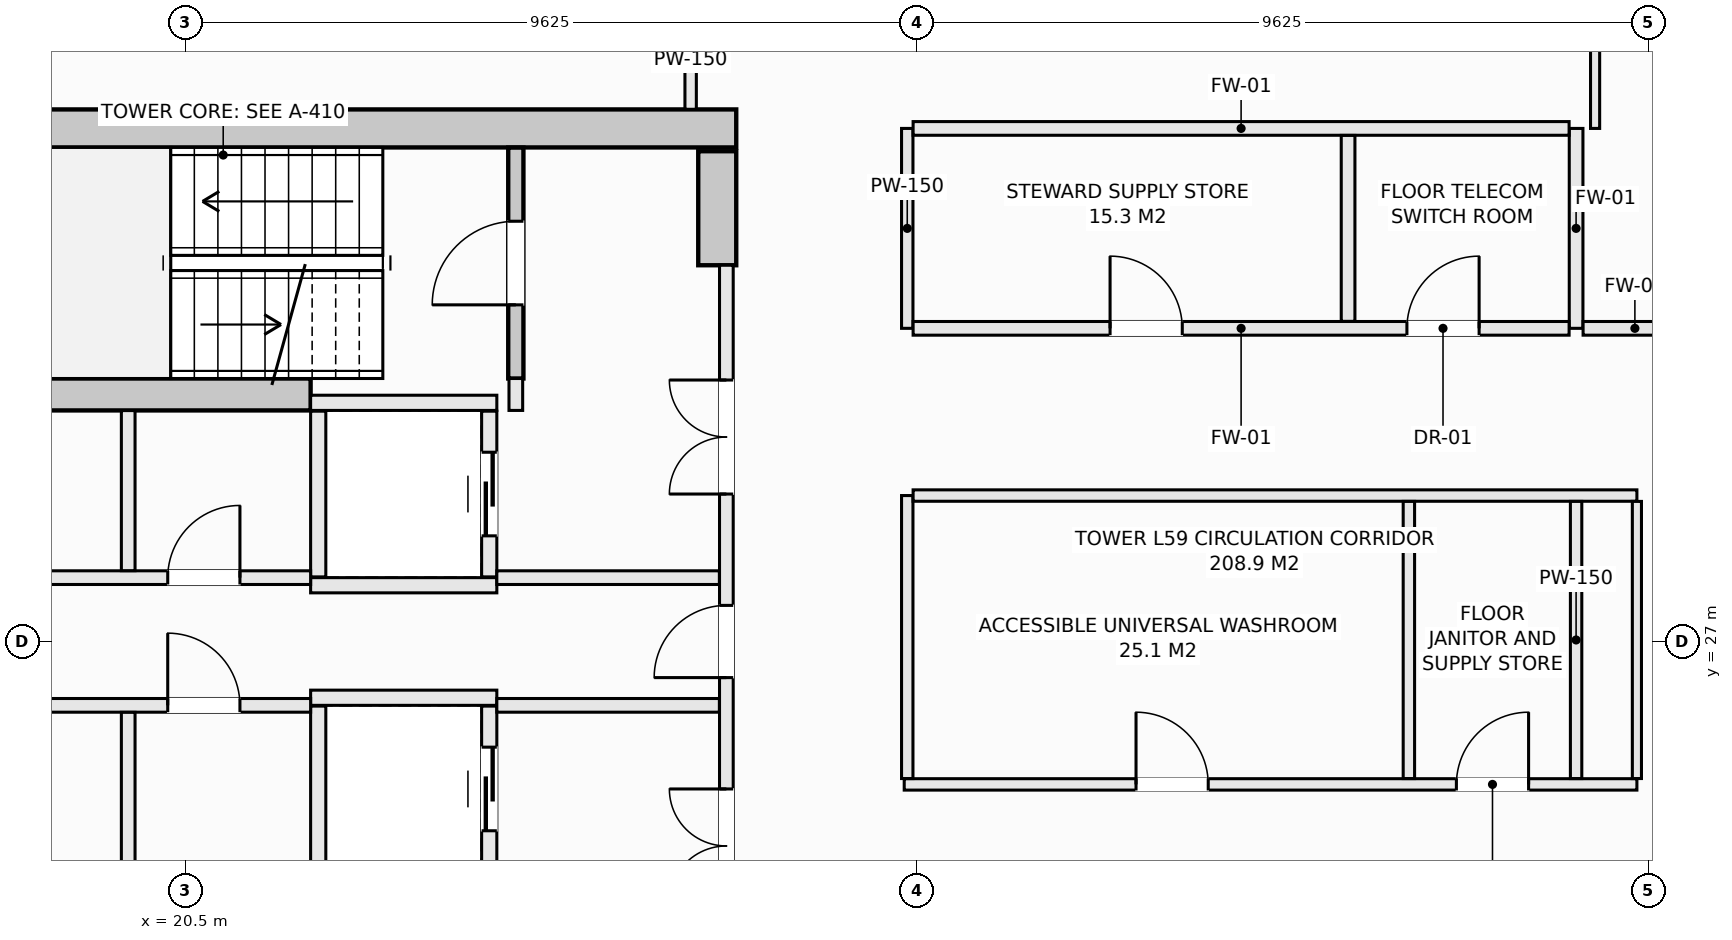
"""IFC4 building model, lengths in metres.
Left out: names, types, materials, properties, quantities, classifications, styles, units other than length and angle.
Written with IfcOpenShell. Run it as: python <this file> out.ifc"""

import sys

from ifc_helpers import new_model, si_unit, direction, frame, frame_2d, origin, place, context, subcontext, project, spatial, rectangle, extrude, element, fill, save


model = new_model("IFC4")
c1 = context("Model", 3, precision=1e-05, world=origin(), true_north=direction((0.0, 1.0)))
c2 = subcontext(c1, "Body", "Model", "MODEL_VIEW")
j1 = project(units=[si_unit("LENGTHUNIT", "METRE"), si_unit("PLANEANGLEUNIT", "RADIAN")], contexts=[c1])
p1 = place(None, origin())
s1 = spatial("IfcSite", under=j1, at=p1, CompositionType="ELEMENT")
p2 = place(p1, origin())
s2 = spatial("IfcBuilding", under=s1, at=p2, CompositionType="ELEMENT")
p3 = place(p2, frame((0.0, 0.0, 222.8)))
s3 = spatial("IfcBuildingStorey", under=s2, at=p3, CompositionType="ELEMENT", Elevation=222.8)
p4 = place(p3, frame((14.25, 33.75, -0.27), z_axis=(0.0, 0.0, 1.0), x_axis=(1.0, 0.0, 0.0)))
e1 = element("IfcWall", 1, at=p4, inside=s3, PredefinedType="SHEAR", context=c2, shape_type="SweptSolid", body=[
    extrude(rectangle(XDim=13.5, YDim=0.5, at=frame_2d((6.75, 0.0))), origin(), (0.0, 0.0, 1.0), 3.3),
])
p5 = place(p3, frame((27.5, 31.95, -0.27), z_axis=(0.0, 0.0, 1.0), x_axis=(0.0, 1.0, 0.0)))
e2 = element("IfcWall", 2, at=p5, inside=s3, PredefinedType="SHEAR", context=c2, shape_type="SweptSolid", body=[
    extrude(rectangle(XDim=1.5, YDim=0.5, at=frame_2d((0.75, 0.0))), origin(), (0.0, 0.0, 1.0), 3.3),
])
p6 = place(p3, frame((14.85, 30.25, -0.27), z_axis=(0.0, 0.0, 1.0), x_axis=(1.0, 0.0, 0.0)))
e3 = element("IfcWall", 3, at=p6, inside=s3, PredefinedType="SHEAR", context=c2, shape_type="SweptSolid", body=[
    extrude(rectangle(XDim=7.3, YDim=0.42, at=frame_2d((3.65, 0.0))), origin(), (0.0, 0.0, 1.0), 3.3),
])
p7 = place(p3, frame((24.85, 30.46, -0.27), z_axis=(0.0, 0.0, 1.0), x_axis=(0.0, 1.0, 0.0)))
e4 = element("IfcWall", 4, at=p7, inside=s3, PredefinedType="SHEAR", context=c2, shape_type="SweptSolid", body=[
    extrude(rectangle(XDim=3.038, YDim=0.2, at=frame_2d((1.519, 0.0))), origin(), (0.0, 0.0, 1.0), 3.3),
])
p8 = place(p7, frame((0.969, 0.0, 0.27)))
e5 = element("IfcOpeningElement", 5, at=p8, cuts=e4, PredefinedType="OPENING", context=c2, shape_type="SweptSolid", body=[
    extrude(rectangle(XDim=1.1, YDim=2.15, at=frame_2d((0.55, 1.075))), frame((0.0, 0.11, 0.0), z_axis=(0.0, -1.0, 0.0), x_axis=(1.0, 0.0, 0.0)), (0.0, 0.0, 1.0), 0.22),
])
for number, where, z_axis, x_axis in (
    (6, (22.15, 30.14, 0.0), (0.0, 0.0, 1.0), (1.0, 0.0, 0.0)),
    (7, (22.15, 27.74, 0.0), (0.0, 0.0, 1.0), (1.0, 0.0, 0.0)),
):
    element("IfcWall", number, at=place(p3, frame(where, z_axis=z_axis, x_axis=x_axis)), inside=s3, PredefinedType="SOLIDWALL", context=c2, shape_type="SweptSolid", body=[
        extrude(rectangle(XDim=2.45, YDim=0.2, at=frame_2d((1.225, 0.0))), origin(), (0.0, 0.0, 1.0), 3.03),
    ])
p9 = place(p3, frame((22.25, 27.85, 0.0), z_axis=(0.0, 0.0, 1.0), x_axis=(0.0, 1.0, 0.0)))
e8 = element("IfcWall", 8, at=p9, inside=s3, PredefinedType="SOLIDWALL", context=c2, shape_type="SweptSolid", body=[
    extrude(rectangle(XDim=2.18, YDim=0.2, at=frame_2d((1.09, 0.0))), origin(), (0.0, 0.0, 1.0), 3.03),
])
p10 = place(p3, frame((24.5, 27.85, 0.0), z_axis=(0.0, 0.0, 1.0), x_axis=(0.0, 1.0, 0.0)))
e9 = element("IfcWall", 9, at=p10, inside=s3, PredefinedType="SOLIDWALL", context=c2, shape_type="SweptSolid", body=[
    extrude(rectangle(XDim=2.18, YDim=0.2, at=frame_2d((1.09, 0.0))), origin(), (0.0, 0.0, 1.0), 3.03),
])
p11 = place(p10, frame((0.54, 0.0, 0.0)))
e10 = element("IfcOpeningElement", 10, at=p11, cuts=e9, PredefinedType="OPENING", context=c2, shape_type="SweptSolid", body=[
    extrude(rectangle(XDim=1.1, YDim=2.2, at=frame_2d((0.55, 1.1))), frame((0.0, 0.11, 0.0), z_axis=(0.0, -1.0, 0.0), x_axis=(1.0, 0.0, 0.0)), (0.0, 0.0, 1.0), 0.22),
])
p12 = place(p3, frame((22.15, 26.26, 0.0), z_axis=(0.0, 0.0, 1.0), x_axis=(1.0, 0.0, 0.0)))
e11 = element("IfcWall", 11, at=p12, inside=s3, PredefinedType="SOLIDWALL", context=c2, shape_type="SweptSolid", body=[
    extrude(rectangle(XDim=2.45, YDim=0.2, at=frame_2d((1.225, 0.0))), origin(), (0.0, 0.0, 1.0), 3.03),
])
p13 = place(p3, frame((22.25, 23.97, 0.0), z_axis=(0.0, 0.0, 1.0), x_axis=(0.0, 1.0, 0.0)))
e12 = element("IfcWall", 12, at=p13, inside=s3, PredefinedType="SOLIDWALL", context=c2, shape_type="SweptSolid", body=[
    extrude(rectangle(XDim=2.18, YDim=0.2, at=frame_2d((1.09, 0.0))), origin(), (0.0, 0.0, 1.0), 3.03),
])
p14 = place(p3, frame((24.5, 23.97, 0.0), z_axis=(0.0, 0.0, 1.0), x_axis=(0.0, 1.0, 0.0)))
e13 = element("IfcWall", 13, at=p14, inside=s3, PredefinedType="SOLIDWALL", context=c2, shape_type="SweptSolid", body=[
    extrude(rectangle(XDim=2.18, YDim=0.2, at=frame_2d((1.09, 0.0))), origin(), (0.0, 0.0, 1.0), 3.03),
])
p15 = place(p14, frame((0.54, 0.0, 0.0)))
e14 = element("IfcOpeningElement", 14, at=p15, cuts=e13, PredefinedType="OPENING", context=c2, shape_type="SweptSolid", body=[
    extrude(rectangle(XDim=1.1, YDim=2.2, at=frame_2d((0.55, 1.1))), frame((0.0, 0.11, 0.0), z_axis=(0.0, -1.0, 0.0), x_axis=(1.0, 0.0, 0.0)), (0.0, 0.0, 1.0), 0.22),
])
p16 = place(p3, frame((24.85, 30.04, 0.0), z_axis=(0.0, 0.0, 1.0), x_axis=(0.0, 1.0, 0.0)))
e15 = element("IfcWall", 15, at=p16, inside=s3, PredefinedType="SOLIDWALL", context=c2, shape_type="SweptSolid", body=[
    extrude(rectangle(XDim=0.42, YDim=0.18, at=frame_2d((0.21, 0.0))), origin(), (0.0, 0.0, 1.0), 3.03),
])
p17 = place(p3, frame((27.62, 22.05, 0.0), z_axis=(0.0, 0.0, 1.0), x_axis=(0.0, 1.0, 0.0)))
e16 = element("IfcWall", 16, at=p17, inside=s3, PredefinedType="SOLIDWALL", context=c2, shape_type="SweptSolid", body=[
    extrude(rectangle(XDim=9.9, YDim=0.18, at=frame_2d((4.95, 0.0))), origin(), (0.0, 0.0, 1.0), 3.03),
])
p18 = place(p17, frame((4.475, 0.0, 0.0)))
e17 = element("IfcOpeningElement", 17, at=p18, cuts=e16, PredefinedType="OPENING", context=c2, shape_type="SweptSolid", body=[
    extrude(rectangle(XDim=0.95, YDim=2.1, at=frame_2d((0.475, 1.05))), frame((0.0, 0.1, 0.0), z_axis=(0.0, -1.0, 0.0), x_axis=(1.0, 0.0, 0.0)), (0.0, 0.0, 1.0), 0.2),
])
p19 = place(p17, frame((6.89, 0.0, 0.0)))
e18 = element("IfcOpeningElement", 18, at=p19, cuts=e16, PredefinedType="OPENING", context=c2, shape_type="SweptSolid", body=[
    extrude(rectangle(XDim=1.5, YDim=2.2, at=frame_2d((0.75, 1.1))), frame((0.0, 0.1, 0.0), z_axis=(0.0, -1.0, 0.0), x_axis=(1.0, 0.0, 0.0)), (0.0, 0.0, 1.0), 0.2),
])
p20 = place(p17, frame((1.51, 0.0, 0.0)))
e19 = element("IfcOpeningElement", 19, at=p20, cuts=e16, PredefinedType="OPENING", context=c2, shape_type="SweptSolid", body=[
    extrude(rectangle(XDim=1.5, YDim=2.2, at=frame_2d((0.75, 1.1))), frame((0.0, 0.1, 0.0), z_axis=(0.0, -1.0, 0.0), x_axis=(1.0, 0.0, 0.0)), (0.0, 0.0, 1.0), 0.2),
])
p21 = place(p3, frame((15.25, 27.84, 0.0), z_axis=(0.0, 0.0, 1.0), x_axis=(1.0, 0.0, 0.0)))
e20 = element("IfcWall", 20, at=p21, inside=s3, PredefinedType="SOLIDWALL", context=c2, shape_type="SweptSolid", body=[
    extrude(rectangle(XDim=6.9, YDim=0.18, at=frame_2d((3.45, 0.0))), origin(), (0.0, 0.0, 1.0), 3.03),
])
p22 = place(p21, frame((5.02, 0.0, 0.0)))
e21 = element("IfcOpeningElement", 21, at=p22, cuts=e20, PredefinedType="OPENING", context=c2, shape_type="SweptSolid", body=[
    extrude(rectangle(XDim=0.95, YDim=2.1, at=frame_2d((0.475, 1.05))), frame((0.0, 0.1, 0.0), z_axis=(0.0, -1.0, 0.0), x_axis=(1.0, 0.0, 0.0)), (0.0, 0.0, 1.0), 0.2),
])
p23 = place(p21, frame((1.98, 0.0, 0.0)))
e22 = element("IfcOpeningElement", 22, at=p23, cuts=e20, PredefinedType="OPENING", context=c2, shape_type="SweptSolid", body=[
    extrude(rectangle(XDim=0.95, YDim=2.1, at=frame_2d((0.475, 1.05))), frame((0.0, 0.1, 0.0), z_axis=(0.0, -1.0, 0.0), x_axis=(1.0, 0.0, 0.0)), (0.0, 0.0, 1.0), 0.2),
])
p24 = place(p3, frame((24.6, 27.84, 0.0), z_axis=(0.0, 0.0, 1.0), x_axis=(1.0, 0.0, 0.0)))
e23 = element("IfcWall", 23, at=p24, inside=s3, PredefinedType="SOLIDWALL", context=c2, shape_type="SweptSolid", body=[
    extrude(rectangle(XDim=2.928, YDim=0.18, at=frame_2d((1.464, 0.0))), origin(), (0.0, 0.0, 1.0), 3.03),
])
p25 = place(p3, frame((15.25, 26.16, 0.0), z_axis=(0.0, 0.0, 1.0), x_axis=(1.0, 0.0, 0.0)))
e24 = element("IfcWall", 24, at=p25, inside=s3, PredefinedType="SOLIDWALL", context=c2, shape_type="SweptSolid", body=[
    extrude(rectangle(XDim=6.9, YDim=0.18, at=frame_2d((3.45, 0.0))), origin(), (0.0, 0.0, 1.0), 3.03),
])
p26 = place(p25, frame((5.02, 0.0, 0.0)))
e25 = element("IfcOpeningElement", 25, at=p26, cuts=e24, PredefinedType="OPENING", context=c2, shape_type="SweptSolid", body=[
    extrude(rectangle(XDim=0.95, YDim=2.1, at=frame_2d((0.475, 1.05))), frame((0.0, 0.1, 0.0), z_axis=(0.0, -1.0, 0.0), x_axis=(1.0, 0.0, 0.0)), (0.0, 0.0, 1.0), 0.2),
])
p27 = place(p25, frame((1.98, 0.0, 0.0)))
e26 = element("IfcOpeningElement", 26, at=p27, cuts=e24, PredefinedType="OPENING", context=c2, shape_type="SweptSolid", body=[
    extrude(rectangle(XDim=0.95, YDim=2.1, at=frame_2d((0.475, 1.05))), frame((0.0, 0.1, 0.0), z_axis=(0.0, -1.0, 0.0), x_axis=(1.0, 0.0, 0.0)), (0.0, 0.0, 1.0), 0.2),
])
p28 = place(p3, frame((24.6, 26.16, 0.0), z_axis=(0.0, 0.0, 1.0), x_axis=(1.0, 0.0, 0.0)))
e27 = element("IfcWall", 27, at=p28, inside=s3, PredefinedType="SOLIDWALL", context=c2, shape_type="SweptSolid", body=[
    extrude(rectangle(XDim=2.928, YDim=0.18, at=frame_2d((1.464, 0.0))), origin(), (0.0, 0.0, 1.0), 3.03),
])
for number, where, z_axis, x_axis in (
    (28, (19.75, 23.962, 0.0), (0.0, 0.0, 1.0), (0.0, 1.0, 0.0)),
    (29, (19.75, 27.932, 0.0), (0.0, 0.0, 1.0), (0.0, 1.0, 0.0)),
):
    element("IfcWall", number, at=place(p3, frame(where, z_axis=z_axis, x_axis=x_axis)), inside=s3, PredefinedType="SOLIDWALL", context=c2, shape_type="SweptSolid", body=[
        extrude(rectangle(XDim=2.106, YDim=0.18, at=frame_2d((1.053, 0.0))), origin(), (0.0, 0.0, 1.0), 3.03),
    ])
p29 = place(p3, frame((27.15, 34.002, 0.0), z_axis=(0.0, 0.0, 1.0), x_axis=(0.0, 1.0, 0.0)))
e30 = element("IfcWall", 30, at=p29, inside=s3, PredefinedType="PARTITIONING", context=c2, shape_type="SweptSolid", body=[
    extrude(rectangle(XDim=4.198, YDim=0.15, at=frame_2d((2.099, 0.0))), origin(), (0.0, 0.0, 1.0), 3.03),
])
p30 = place(p29, frame((1.998, 0.0, 0.0)))
e31 = element("IfcOpeningElement", 31, at=p30, cuts=e30, PredefinedType="OPENING", context=c2, shape_type="SweptSolid", body=[
    extrude(rectangle(XDim=0.95, YDim=2.1, at=frame_2d((0.475, 1.05))), frame((0.0, 0.085, 0.0), z_axis=(0.0, -1.0, 0.0), x_axis=(1.0, 0.0, 0.0)), (0.0, 0.0, 1.0), 0.17),
])
p31 = place(p3, frame((29.96, 25.12, 0.0), z_axis=(0.0, 0.0, 1.0), x_axis=(1.0, 0.0, 0.0)))
e32 = element("IfcWall", 32, at=p31, inside=s3, PredefinedType="PARTITIONING", context=c2, shape_type="SweptSolid", body=[
    extrude(rectangle(XDim=9.64, YDim=0.15, at=frame_2d((4.82, 0.0))), origin(), (0.0, 0.0, 1.0), 3.03),
])
p32 = place(p31, frame((3.05, 0.0, 0.0)))
e33 = element("IfcOpeningElement", 33, at=p32, cuts=e32, PredefinedType="OPENING", context=c2, shape_type="SweptSolid", body=[
    extrude(rectangle(XDim=0.95, YDim=2.1, at=frame_2d((0.475, 1.05))), frame((0.0, 0.085, 0.0), z_axis=(0.0, -1.0, 0.0), x_axis=(1.0, 0.0, 0.0)), (0.0, 0.0, 1.0), 0.17),
])
p33 = place(p31, frame((7.265, 0.0, 0.0)))
e34 = element("IfcOpeningElement", 34, at=p33, cuts=e32, PredefinedType="OPENING", context=c2, shape_type="SweptSolid", body=[
    extrude(rectangle(XDim=0.95, YDim=2.1, at=frame_2d((0.475, 1.05))), frame((0.0, 0.085, 0.0), z_axis=(0.0, -1.0, 0.0), x_axis=(1.0, 0.0, 0.0)), (0.0, 0.0, 1.0), 0.17),
])
p34 = place(p3, frame((30.0, 25.197, 0.0), z_axis=(0.0, 0.0, 1.0), x_axis=(0.0, 1.0, 0.0)))
e35 = element("IfcWall", 35, at=p34, inside=s3, PredefinedType="PARTITIONING", context=c2, shape_type="SweptSolid", body=[
    extrude(rectangle(XDim=3.723, YDim=0.15, at=frame_2d((1.861, 0.0))), origin(), (0.0, 0.0, 1.0), 3.03),
])
p35 = place(p3, frame((30.0, 31.12, 0.0), z_axis=(0.0, 0.0, 1.0), x_axis=(0.0, 1.0, 0.0)))
e36 = element("IfcWall", 36, at=p35, inside=s3, PredefinedType="PARTITIONING", context=c2, shape_type="SweptSolid", body=[
    extrude(rectangle(XDim=2.63, YDim=0.15, at=frame_2d((1.315, 0.0))), origin(), (0.0, 0.0, 1.0), 3.03),
])
p36 = place(p3, frame((30.077, 28.92, 0.0), z_axis=(0.0, 0.0, 1.0), x_axis=(1.0, 0.0, 0.0)))
e37 = element("IfcWall", 37, at=p36, inside=s3, PredefinedType="PARTITIONING", context=c2, shape_type="SweptSolid", body=[
    extrude(rectangle(XDim=9.523, YDim=0.15, at=frame_2d((4.762, 0.0))), origin(), (0.0, 0.0, 1.0), 3.03),
])
for number, where, z_axis, x_axis in (
    (38, (36.6, 25.197, 0.0), (0.0, 0.0, 1.0), (0.0, 1.0, 0.0)),
    (39, (38.8, 25.197, 0.0), (0.0, 0.0, 1.0), (0.0, 1.0, 0.0)),
):
    element("IfcWall", number, at=place(p3, frame(where, z_axis=z_axis, x_axis=x_axis)), inside=s3, PredefinedType="PARTITIONING", context=c2, shape_type="SweptSolid", body=[
        extrude(rectangle(XDim=3.646, YDim=0.15, at=frame_2d((1.823, 0.0))), origin(), (0.0, 0.0, 1.0), 3.03),
    ])
p37 = place(p3, frame((38.8, 31.12, 0.0), z_axis=(0.0, 0.0, 1.0), x_axis=(0.0, 1.0, 0.0)))
e40 = element("IfcWall", 40, at=p37, inside=s3, PredefinedType="SOLIDWALL", context=c2, shape_type="SweptSolid", body=[
    extrude(rectangle(XDim=2.63, YDim=0.18, at=frame_2d((1.315, 0.0))), origin(), (0.0, 0.0, 1.0), 3.03),
])
p38 = place(p3, frame((30.077, 31.12, 0.0), z_axis=(0.0, 0.0, 1.0), x_axis=(1.0, 0.0, 0.0)))
e41 = element("IfcWall", 41, at=p38, inside=s3, PredefinedType="SOLIDWALL", context=c2, shape_type="SweptSolid", body=[
    extrude(rectangle(XDim=8.631, YDim=0.18, at=frame_2d((4.315, 0.0))), origin(), (0.0, 0.0, 1.0), 3.03),
])
p39 = place(p38, frame((2.592, 0.0, 0.0)))
e42 = element("IfcOpeningElement", 42, at=p39, cuts=e41, PredefinedType="OPENING", context=c2, shape_type="SweptSolid", body=[
    extrude(rectangle(XDim=0.95, YDim=2.1, at=frame_2d((0.475, 1.05))), frame((0.0, 0.1, 0.0), z_axis=(0.0, -1.0, 0.0), x_axis=(1.0, 0.0, 0.0)), (0.0, 0.0, 1.0), 0.2),
])
p40 = place(p38, frame((6.497, 0.0, 0.0)))
e43 = element("IfcOpeningElement", 43, at=p40, cuts=e41, PredefinedType="OPENING", context=c2, shape_type="SweptSolid", body=[
    extrude(rectangle(XDim=0.95, YDim=2.1, at=frame_2d((0.475, 1.05))), frame((0.0, 0.1, 0.0), z_axis=(0.0, -1.0, 0.0), x_axis=(1.0, 0.0, 0.0)), (0.0, 0.0, 1.0), 0.2),
])
p41 = place(p3, frame((38.892, 31.12, 0.0), z_axis=(0.0, 0.0, 1.0), x_axis=(1.0, 0.0, 0.0)))
e44 = element("IfcWall", 44, at=p41, inside=s3, PredefinedType="SOLIDWALL", context=c2, shape_type="SweptSolid", body=[
    extrude(rectangle(XDim=1.363, YDim=0.18, at=frame_2d((0.681, 0.0))), origin(), (0.0, 0.0, 1.0), 3.03),
])
p42 = place(p3, frame((30.077, 33.75, 0.0), z_axis=(0.0, 0.0, 1.0), x_axis=(1.0, 0.0, 0.0)))
e45 = element("IfcWall", 45, at=p42, inside=s3, PredefinedType="SOLIDWALL", context=c2, shape_type="SweptSolid", body=[
    extrude(rectangle(XDim=8.631, YDim=0.18, at=frame_2d((4.315, 0.0))), origin(), (0.0, 0.0, 1.0), 3.03),
])
p43 = place(p3, frame((35.8, 31.212, 0.0), z_axis=(0.0, 0.0, 1.0), x_axis=(0.0, 1.0, 0.0)))
e46 = element("IfcWall", 46, at=p43, inside=s3, PredefinedType="SOLIDWALL", context=c2, shape_type="SweptSolid", body=[
    extrude(rectangle(XDim=2.446, YDim=0.18, at=frame_2d((1.223, 0.0))), origin(), (0.0, 0.0, 1.0), 3.03),
])
p44 = place(p3, frame((39.05, 33.75, 0.0), z_axis=(0.0, 0.0, 1.0), x_axis=(0.0, 1.0, 0.0)))
e47 = element("IfcWall", 47, at=p44, inside=s3, PredefinedType="PARTITIONING", context=c2, shape_type="SweptSolid", body=[
    extrude(rectangle(XDim=1.938, YDim=0.12, at=frame_2d((0.969, 0.0))), origin(), (0.0, 0.0, 1.0), 3.03),
])
p45 = place(p3, frame((39.6, 25.197, 0.0), z_axis=(0.0, 0.0, 1.0), x_axis=(0.0, 1.0, 0.0)))
e48 = element("IfcWall", 48, at=p45, inside=s3, PredefinedType="PARTITIONING", context=c2, shape_type="SweptSolid", body=[
    extrude(rectangle(XDim=3.646, YDim=0.12, at=frame_2d((1.823, 0.0))), origin(), (0.0, 0.0, 1.0), 3.03),
])
p46 = place(p8, origin())
e49 = element("IfcDoor", 49, at=p46, inside=s3, OperationType="SINGLE_SWING_LEFT", PredefinedType="DOOR", context=c2, shape_type="SweptSolid", body=[
    extrude(rectangle(XDim=1.1, YDim=2.15, at=frame_2d((0.55, 1.075))), frame((0.0, 0.025, 0.0), z_axis=(0.0, -1.0, 0.0), x_axis=(1.0, 0.0, 0.0)), (0.0, 0.0, 1.0), 0.05),
])
fill(e5, e49)
p47 = place(p11, origin())
e50 = element("IfcDoor", 50, at=p47, inside=s3, OperationType="SLIDING_TO_LEFT", PredefinedType="DOOR", context=c2, shape_type="SweptSolid", body=[
    extrude(rectangle(XDim=1.1, YDim=2.2, at=frame_2d((0.55, 1.1))), frame((0.0, 0.025, 0.0), z_axis=(0.0, -1.0, 0.0), x_axis=(1.0, 0.0, 0.0)), (0.0, 0.0, 1.0), 0.05),
])
fill(e10, e50)
p48 = place(p15, origin())
e51 = element("IfcDoor", 51, at=p48, inside=s3, OperationType="SLIDING_TO_LEFT", PredefinedType="DOOR", context=c2, shape_type="SweptSolid", body=[
    extrude(rectangle(XDim=1.1, YDim=2.2, at=frame_2d((0.55, 1.1))), frame((0.0, 0.025, 0.0), z_axis=(0.0, -1.0, 0.0), x_axis=(1.0, 0.0, 0.0)), (0.0, 0.0, 1.0), 0.05),
])
fill(e14, e51)
p49 = place(p18, origin())
e52 = element("IfcDoor", 52, at=p49, inside=s3, OperationType="SINGLE_SWING_LEFT", PredefinedType="DOOR", context=c2, shape_type="SweptSolid", body=[
    extrude(rectangle(XDim=0.95, YDim=2.1, at=frame_2d((0.475, 1.05))), frame((0.0, 0.025, 0.0), z_axis=(0.0, -1.0, 0.0), x_axis=(1.0, 0.0, 0.0)), (0.0, 0.0, 1.0), 0.05),
])
fill(e17, e52)
p50 = place(p19, origin())
e53 = element("IfcDoor", 53, at=p50, inside=s3, OperationType="DOUBLE_DOOR_SINGLE_SWING", PredefinedType="DOOR", context=c2, shape_type="SweptSolid", body=[
    extrude(rectangle(XDim=1.5, YDim=2.2, at=frame_2d((0.75, 1.1))), frame((0.0, 0.025, 0.0), z_axis=(0.0, -1.0, 0.0), x_axis=(1.0, 0.0, 0.0)), (0.0, 0.0, 1.0), 0.05),
])
fill(e18, e53)
p51 = place(p20, origin())
e54 = element("IfcDoor", 54, at=p51, inside=s3, OperationType="DOUBLE_DOOR_SINGLE_SWING", PredefinedType="DOOR", context=c2, shape_type="SweptSolid", body=[
    extrude(rectangle(XDim=1.5, YDim=2.2, at=frame_2d((0.75, 1.1))), frame((0.0, 0.025, 0.0), z_axis=(0.0, -1.0, 0.0), x_axis=(1.0, 0.0, 0.0)), (0.0, 0.0, 1.0), 0.05),
])
fill(e19, e54)
p52 = place(p22, origin())
e55 = element("IfcDoor", 55, at=p52, inside=s3, OperationType="SINGLE_SWING_RIGHT", PredefinedType="DOOR", context=c2, shape_type="SweptSolid", body=[
    extrude(rectangle(XDim=0.95, YDim=2.1, at=frame_2d((0.475, 1.05))), frame((0.0, 0.025, 0.0), z_axis=(0.0, -1.0, 0.0), x_axis=(1.0, 0.0, 0.0)), (0.0, 0.0, 1.0), 0.05),
])
fill(e21, e55)
p53 = place(p26, origin())
e56 = element("IfcDoor", 56, at=p53, inside=s3, OperationType="SINGLE_SWING_LEFT", PredefinedType="DOOR", context=c2, shape_type="SweptSolid", body=[
    extrude(rectangle(XDim=0.95, YDim=2.1, at=frame_2d((0.475, 1.05))), frame((0.0, 0.025, 0.0), z_axis=(0.0, -1.0, 0.0), x_axis=(1.0, 0.0, 0.0)), (0.0, 0.0, 1.0), 0.05),
])
fill(e25, e56)
p54 = place(p32, origin())
e57 = element("IfcDoor", 57, at=p54, inside=s3, OperationType="SINGLE_SWING_LEFT", PredefinedType="DOOR", context=c2, shape_type="SweptSolid", body=[
    extrude(rectangle(XDim=0.95, YDim=2.1, at=frame_2d((0.475, 1.05))), frame((0.0, 0.025, 0.0), z_axis=(0.0, -1.0, 0.0), x_axis=(1.0, 0.0, 0.0)), (0.0, 0.0, 1.0), 0.05),
])
fill(e33, e57)
p55 = place(p33, origin())
e58 = element("IfcDoor", 58, at=p55, inside=s3, OperationType="SINGLE_SWING_RIGHT", PredefinedType="DOOR", context=c2, shape_type="SweptSolid", body=[
    extrude(rectangle(XDim=0.95, YDim=2.1, at=frame_2d((0.475, 1.05))), frame((0.0, 0.025, 0.0), z_axis=(0.0, -1.0, 0.0), x_axis=(1.0, 0.0, 0.0)), (0.0, 0.0, 1.0), 0.05),
])
fill(e34, e58)
p56 = place(p39, origin())
e59 = element("IfcDoor", 59, at=p56, inside=s3, OperationType="SINGLE_SWING_LEFT", PredefinedType="DOOR", context=c2, shape_type="SweptSolid", body=[
    extrude(rectangle(XDim=0.95, YDim=2.1, at=frame_2d((0.475, 1.05))), frame((0.0, 0.025, 0.0), z_axis=(0.0, -1.0, 0.0), x_axis=(1.0, 0.0, 0.0)), (0.0, 0.0, 1.0), 0.05),
])
fill(e42, e59)
p57 = place(p40, origin())
e60 = element("IfcDoor", 60, at=p57, inside=s3, OperationType="SINGLE_SWING_RIGHT", PredefinedType="DOOR", context=c2, shape_type="SweptSolid", body=[
    extrude(rectangle(XDim=0.95, YDim=2.1, at=frame_2d((0.475, 1.05))), frame((0.0, 0.025, 0.0), z_axis=(0.0, -1.0, 0.0), x_axis=(1.0, 0.0, 0.0)), (0.0, 0.0, 1.0), 0.05),
])
fill(e43, e60)
save(model, sys.argv[1])
